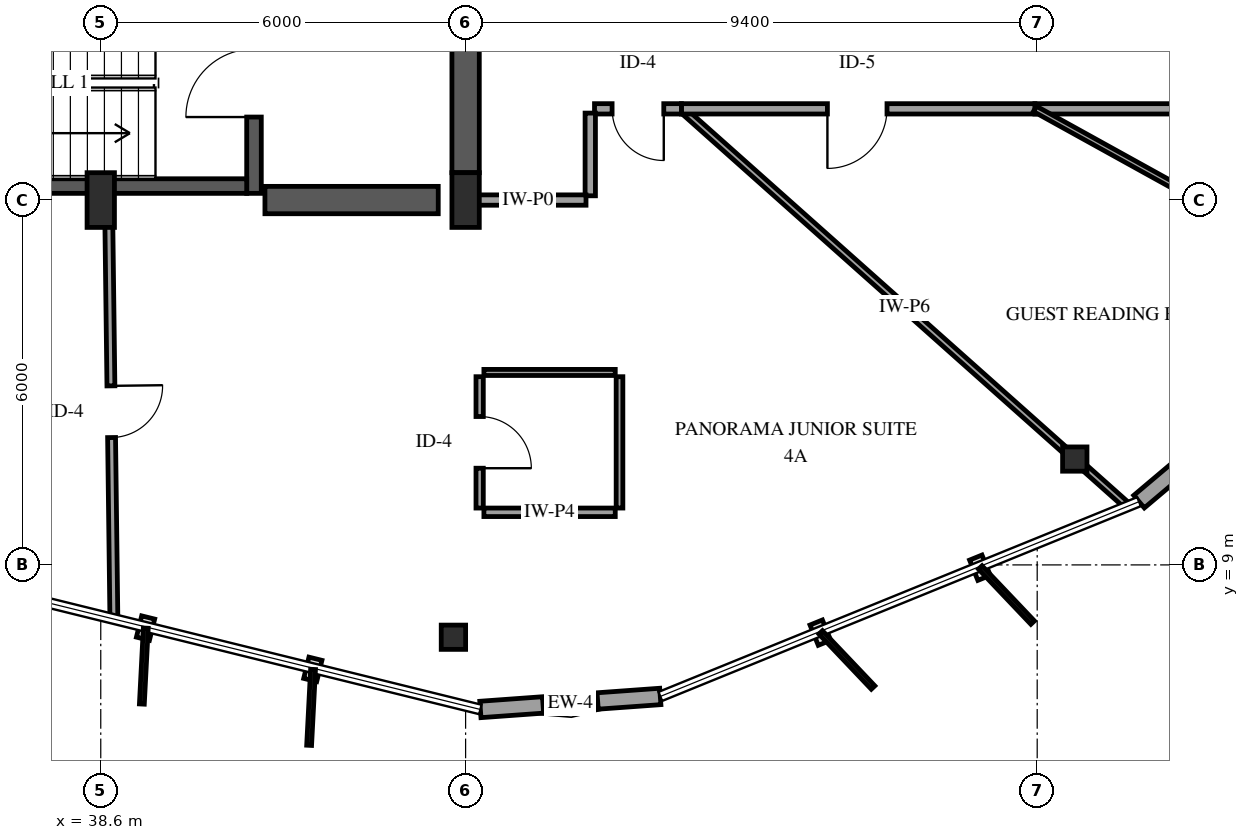
"""IFC4 building model, lengths in metres.
Left out: names, types, materials, properties, quantities, classifications, styles, units other than length and angle.
Written with IfcOpenShell. Run it as: python <this file> out.ifc"""

import sys

from ifc_helpers import new_model, si_unit, direction, frame, frame_2d, origin, origin_2d, place, context, subcontext, project, spatial, rectangle, i_section, extrude, element, fill, save


model = new_model("IFC4")
c1 = context("Model", 3, precision=1e-05, world=origin(), true_north=direction((0.0, 1.0)))
c2 = subcontext(c1, "Body", "Model", "MODEL_VIEW")
j1 = project(units=[si_unit("LENGTHUNIT", "METRE"), si_unit("PLANEANGLEUNIT", "RADIAN")], contexts=[c1])
p1 = place(None, origin())
s1 = spatial("IfcSite", under=j1, at=p1, CompositionType="ELEMENT")
p2 = place(p1, origin())
s2 = spatial("IfcBuilding", under=s1, at=p2, CompositionType="ELEMENT")
p3 = place(p2, frame((0.0, 0.0, 246.25)))
s3 = spatial("IfcBuildingStorey", under=s2, at=p3, CompositionType="ELEMENT", Elevation=246.25)
p4 = place(p3, frame((41.12, 15.11, 0.0), z_axis=(0.0, 0.0, 1.0), x_axis=(0.0, 1.0, 0.0)))
e1 = element("IfcWall", 1, at=p4, inside=s3, PredefinedType="SHEAR", context=c2, shape_type="SweptSolid", body=[
    extrude(rectangle(XDim=3.63, YDim=0.24, at=frame_2d((1.815, 0.0))), origin(), (0.0, 0.0, 1.0), 3.75),
])
p5 = place(p4, frame((1.255, 0.0, 0.0)))
e2 = element("IfcOpeningElement", 2, at=p5, cuts=e1, PredefinedType="OPENING", context=c2, shape_type="SweptSolid", body=[
    extrude(rectangle(XDim=1.12, YDim=2.15, at=frame_2d((0.56, 1.075))), frame((0.0, 0.13, 0.0), z_axis=(0.0, -1.0, 0.0), x_axis=(1.0, 0.0, 0.0)), (0.0, 0.0, 1.0), 0.26),
])
p6 = place(p3, frame((33.0, 15.23, 0.0), z_axis=(0.0, 0.0, 1.0), x_axis=(1.0, 0.0, 0.0)))
e3 = element("IfcWall", 3, at=p6, inside=s3, PredefinedType="SHEAR", context=c2, shape_type="SweptSolid", body=[
    extrude(rectangle(XDim=8.0, YDim=0.24, at=frame_2d((4.0, 0.0))), origin(), (0.0, 0.0, 1.0), 3.75),
])
p7 = place(p3, frame((41.3, 15.0, 0.0), z_axis=(0.0, 0.0, 1.0), x_axis=(1.0, 0.0, 0.0)))
e4 = element("IfcWall", 4, at=p7, inside=s3, PredefinedType="SHEAR", context=c2, shape_type="SweptSolid", body=[
    extrude(rectangle(XDim=2.85, YDim=0.45, at=frame_2d((1.425, 0.0))), origin(), (0.0, 0.0, 1.0), 3.75),
])
p8 = place(p3, frame((44.6, 15.45, 0.0), z_axis=(0.0, 0.0, 1.0), x_axis=(0.0, 1.0, 0.0)))
e5 = element("IfcWall", 5, at=p8, inside=s3, PredefinedType="SHEAR", context=c2, shape_type="SweptSolid", body=[
    extrude(rectangle(XDim=6.35, YDim=0.45, at=frame_2d((3.175, 0.0))), origin(), (0.0, 0.0, 1.0), 3.75),
])
for number, where, z_axis, x_axis in (
    (6, (38.6, 15.0, 0.0), (0.0, 0.0, 1.0), (1.0, 0.0, 0.0)),
    (7, (44.6, 15.0, 0.0), (0.0, 0.0, 1.0), (1.0, 0.0, 0.0)),
):
    element("IfcColumn", number, at=place(p3, frame(where, z_axis=z_axis, x_axis=x_axis)), inside=s3, PredefinedType="PILASTER", context=c2, shape_type="SweptSolid", body=[
        extrude(rectangle(XDim=0.45, YDim=0.9, at=origin_2d()), origin(), (0.0, 0.0, 1.0), 3.75),
    ])
for number, where, z_axis, x_axis in (
    (8, (44.4, 7.811, 0.0), (0.0, 0.0, 1.0), (1.0, 0.0, 0.0)),
    (9, (54.618, 10.74, 0.0), (0.0, 0.0, 1.0), (1.0, 0.0, 0.0)),
):
    element("IfcColumn", number, at=place(p3, frame(where, z_axis=z_axis, x_axis=x_axis)), inside=s3, PredefinedType="COLUMN", context=c2, shape_type="SweptSolid", body=[
        extrude(i_section(OverallWidth=0.401, OverallDepth=0.399, WebThickness=0.025, FlangeThickness=0.04, FilletRadius=0.038, at=origin_2d()), origin(), (0.0, 0.0, 1.0), 3.75),
    ])
p9 = place(p3, frame((44.843, 6.623, 0.0), z_axis=(0.0, 0.0, 1.0), x_axis=(0.997392270269, 0.072171041339, 0.0)))
e10 = element("IfcWall", 10, at=p9, inside=s3, PredefinedType="SOLIDWALL", context=c2, shape_type="SweptSolid", body=[
    extrude(rectangle(XDim=2.967, YDim=0.27, at=frame_2d((1.483, 0.0))), origin(), (0.0, 0.0, 1.0), 2.829),
])
p10 = place(p9, frame((1.033, 0.0, 0.75)))
e11 = element("IfcOpeningElement", 11, at=p10, cuts=e10, PredefinedType="OPENING", context=c2, shape_type="SweptSolid", body=[
    extrude(rectangle(XDim=0.9, YDim=1.5, at=frame_2d((0.45, 0.75))), frame((0.0, 0.145, 0.0), z_axis=(0.0, -1.0, 0.0), x_axis=(1.0, 0.0, 0.0)), (0.0, 0.0, 1.0), 0.29),
])
p11 = place(p3, frame((55.675, 10.04, 0.0), z_axis=(0.0, 0.0, 1.0), x_axis=(0.764511985062, 0.644609513347, 0.0)))
e12 = element("IfcWall", 12, at=p11, inside=s3, PredefinedType="SOLIDWALL", context=c2, shape_type="SweptSolid", body=[
    extrude(rectangle(XDim=2.967, YDim=0.27, at=frame_2d((1.483, 0.0))), origin(), (0.0, 0.0, 1.0), 2.829),
])
p12 = place(p11, frame((1.033, 0.0, 0.75)))
e13 = element("IfcOpeningElement", 13, at=p12, cuts=e12, PredefinedType="OPENING", context=c2, shape_type="SweptSolid", body=[
    extrude(rectangle(XDim=0.9, YDim=1.5, at=frame_2d((0.45, 0.75))), frame((0.0, 0.145, 0.0), z_axis=(0.0, -1.0, 0.0), x_axis=(1.0, 0.0, 0.0)), (0.0, 0.0, 1.0), 0.29),
])
p13 = place(p3, frame((48.149, 16.5, 0.0), z_axis=(0.0, 0.0, 1.0), x_axis=(0.746928074218, -0.664904844278, 0.0)))
e14 = element("IfcWall", 14, at=p13, inside=s3, PredefinedType="PARTITIONING", context=c2, shape_type="SweptSolid", body=[
    extrude(rectangle(XDim=9.828, YDim=0.11, at=frame_2d((4.914, 0.0))), origin(), (0.0, 0.0, 1.0), 2.828),
])
p14 = place(p3, frame((38.729, 14.929, 0.0), z_axis=(0.0, 0.0, 1.0), x_axis=(0.01274511582, -0.999918777713, 0.0)))
e15 = element("IfcWall", 15, at=p14, inside=s3, PredefinedType="PARTITIONING", context=c2, shape_type="SweptSolid", body=[
    extrude(rectangle(XDim=6.819, YDim=0.13, at=frame_2d((3.41, 0.0))), origin(), (0.0, 0.0, 1.0), 3.45),
])
p15 = place(p14, frame((2.985, 0.0, 0.0)))
e16 = element("IfcOpeningElement", 16, at=p15, cuts=e15, PredefinedType="OPENING", context=c2, shape_type="SweptSolid", body=[
    extrude(rectangle(XDim=0.85, YDim=2.1, at=frame_2d((0.425, 1.05))), frame((0.0, 0.075, 0.0), z_axis=(0.0, -1.0, 0.0), x_axis=(1.0, 0.0, 0.0)), (0.0, 0.0, 1.0), 0.15),
])
p16 = place(p3, frame((60.769, 16.5, 0.0), z_axis=(0.0, 0.0, 1.0), x_axis=(-1.0, 0.0, 0.0)))
e17 = element("IfcWall", 17, at=p16, inside=s3, PredefinedType="PARTITIONING", context=c2, shape_type="SweptSolid", body=[
    extrude(rectangle(XDim=6.807, YDim=0.17, at=frame_2d((3.404, 0.0))), origin(), (0.0, 0.0, 1.0), 3.45),
])
p17 = place(p16, frame((2.928, 0.0, 0.0)))
e18 = element("IfcOpeningElement", 18, at=p17, cuts=e17, PredefinedType="OPENING", context=c2, shape_type="SweptSolid", body=[
    extrude(rectangle(XDim=0.98, YDim=2.15, at=frame_2d((0.49, 1.075))), frame((0.0, 0.095, 0.0), z_axis=(0.0, -1.0, 0.0), x_axis=(1.0, 0.0, 0.0)), (0.0, 0.0, 1.0), 0.19),
])
p18 = place(p3, frame((53.962, 16.5, 0.0), z_axis=(0.0, 0.0, 1.0), x_axis=(-1.0, 0.0, 0.0)))
e19 = element("IfcWall", 19, at=p18, inside=s3, PredefinedType="PARTITIONING", context=c2, shape_type="SweptSolid", body=[
    extrude(rectangle(XDim=5.813, YDim=0.17, at=frame_2d((2.906, 0.0))), origin(), (0.0, 0.0, 1.0), 3.45),
])
p19 = place(p18, frame((2.432, 0.0, 0.0)))
e20 = element("IfcOpeningElement", 20, at=p19, cuts=e19, PredefinedType="OPENING", context=c2, shape_type="SweptSolid", body=[
    extrude(rectangle(XDim=0.98, YDim=2.15, at=frame_2d((0.49, 1.075))), frame((0.0, 0.095, 0.0), z_axis=(0.0, -1.0, 0.0), x_axis=(1.0, 0.0, 0.0)), (0.0, 0.0, 1.0), 0.19),
])
p20 = place(p3, frame((53.962, 16.5, 0.0), z_axis=(0.0, 0.0, 1.0), x_axis=(0.875035182715, -0.484059323855, 0.0)))
e21 = element("IfcWall", 21, at=p20, inside=s3, PredefinedType="PARTITIONING", context=c2, shape_type="SweptSolid", body=[
    extrude(rectangle(XDim=5.789, YDim=0.1, at=frame_2d((2.894, 0.0))), origin(), (0.0, 0.0, 1.0), 3.45),
])
p21 = place(p3, frame((44.831, 12.095, 0.0), z_axis=(0.0, 0.0, 1.0), x_axis=(0.0, -1.0, 0.0)))
e22 = element("IfcWall", 22, at=p21, inside=s3, PredefinedType="PARTITIONING", context=c2, shape_type="SweptSolid", body=[
    extrude(rectangle(XDim=2.16, YDim=0.12, at=frame_2d((1.08, 0.0))), origin(), (0.0, 0.0, 1.0), 2.828),
])
p22 = place(p21, frame((0.655, 0.0, 0.0)))
e23 = element("IfcOpeningElement", 23, at=p22, cuts=e22, PredefinedType="OPENING", context=c2, shape_type="SweptSolid", body=[
    extrude(rectangle(XDim=0.85, YDim=2.1, at=frame_2d((0.425, 1.05))), frame((0.0, 0.07, 0.0), z_axis=(0.0, -1.0, 0.0), x_axis=(1.0, 0.0, 0.0)), (0.0, 0.0, 1.0), 0.14),
])
p23 = place(p3, frame((47.131, 9.935, 0.0), z_axis=(0.0, 0.0, 1.0), x_axis=(0.0, 1.0, 0.0)))
e24 = element("IfcWall", 24, at=p23, inside=s3, PredefinedType="PARTITIONING", context=c2, shape_type="SweptSolid", body=[
    extrude(rectangle(XDim=2.16, YDim=0.11, at=frame_2d((1.08, 0.0))), origin(), (0.0, 0.0, 1.0), 3.45),
])
p24 = place(p3, frame((47.061, 12.165, 0.0), z_axis=(0.0, 0.0, 1.0), x_axis=(-1.0, 0.0, 0.0)))
e25 = element("IfcWall", 25, at=p24, inside=s3, PredefinedType="PARTITIONING", context=c2, shape_type="SweptSolid", body=[
    extrude(rectangle(XDim=2.16, YDim=0.1, at=frame_2d((1.08, 0.0))), origin(), (0.0, 0.0, 1.0), 3.45),
])
p25 = place(p3, frame((44.901, 9.865, 0.0), z_axis=(0.0, 0.0, 1.0), x_axis=(1.0, 0.0, 0.0)))
e26 = element("IfcWall", 26, at=p25, inside=s3, PredefinedType="PARTITIONING", context=c2, shape_type="SweptSolid", body=[
    extrude(rectangle(XDim=2.16, YDim=0.14, at=frame_2d((1.08, 0.0))), origin(), (0.0, 0.0, 1.0), 3.45),
])
p26 = place(p3, frame((48.149, 16.5, 0.0), z_axis=(0.0, 0.0, 1.0), x_axis=(-1.0, 0.0, 0.0)))
e27 = element("IfcWall", 27, at=p26, inside=s3, PredefinedType="PARTITIONING", context=c2, shape_type="SweptSolid", body=[
    extrude(rectangle(XDim=1.429, YDim=0.17, at=frame_2d((0.714, 0.0))), origin(), (0.0, 0.0, 1.0), 3.45),
])
p27 = place(p26, frame((0.29, 0.0, 0.0)))
e28 = element("IfcOpeningElement", 28, at=p27, cuts=e27, PredefinedType="OPENING", context=c2, shape_type="SweptSolid", body=[
    extrude(rectangle(XDim=0.85, YDim=2.1, at=frame_2d((0.425, 1.05))), frame((0.0, 0.095, 0.0), z_axis=(0.0, -1.0, 0.0), x_axis=(1.0, 0.0, 0.0)), (0.0, 0.0, 1.0), 0.19),
])
p28 = place(p3, frame((46.65, 16.43, 0.0), z_axis=(0.0, 0.0, 1.0), x_axis=(0.0, -1.0, 0.0)))
e29 = element("IfcWall", 29, at=p28, inside=s3, PredefinedType="PARTITIONING", context=c2, shape_type="SweptSolid", body=[
    extrude(rectangle(XDim=1.36, YDim=0.17, at=frame_2d((0.68, 0.0))), origin(), (0.0, 0.0, 1.0), 3.45),
])
p29 = place(p3, frame((46.58, 15.0, 0.0), z_axis=(0.0, 0.0, 1.0), x_axis=(-1.0, 0.0, 0.0)))
e30 = element("IfcWall", 30, at=p29, inside=s3, PredefinedType="PARTITIONING", context=c2, shape_type="SweptSolid", body=[
    extrude(rectangle(XDim=1.139, YDim=0.17, at=frame_2d((0.57, 0.0))), origin(), (0.0, 0.0, 1.0), 3.45),
])
p30 = place(p3, frame((45.439, 15.0, 0.0), z_axis=(0.0, 0.0, 1.0), x_axis=(-1.0, 0.0, 0.0)))
e31 = element("IfcWall", 31, at=p30, inside=s3, PredefinedType="PARTITIONING", context=c2, shape_type="SweptSolid", body=[
    extrude(rectangle(XDim=0.769, YDim=0.17, at=frame_2d((0.385, 0.0))), origin(), (0.0, 0.0, 1.0), 3.45),
])
p31 = place(p10, origin())
e32 = element("IfcWindow", 32, at=p31, inside=s3, PartitioningType="SINGLE_PANEL", PredefinedType="WINDOW", context=c2, shape_type="SweptSolid", body=[
    extrude(rectangle(XDim=0.9, YDim=1.5, at=frame_2d((0.45, 0.75))), frame((0.0, 0.03, 0.0), z_axis=(0.0, -1.0, 0.0), x_axis=(1.0, 0.0, 0.0)), (0.0, 0.0, 1.0), 0.06),
])
fill(e11, e32)
p32 = place(p5, origin())
e33 = element("IfcDoor", 33, at=p32, inside=s3, OperationType="SINGLE_SWING_LEFT", PredefinedType="DOOR", context=c2, shape_type="SweptSolid", body=[
    extrude(rectangle(XDim=1.12, YDim=2.15, at=frame_2d((0.56, 1.075))), frame((0.0, 0.025, 0.0), z_axis=(0.0, -1.0, 0.0), x_axis=(1.0, 0.0, 0.0)), (0.0, 0.0, 1.0), 0.05),
])
fill(e2, e33)
p33 = place(p15, origin())
e34 = element("IfcDoor", 34, at=p33, inside=s3, OperationType="SINGLE_SWING_LEFT", PredefinedType="DOOR", context=c2, shape_type="SweptSolid", body=[
    extrude(rectangle(XDim=0.85, YDim=2.1, at=frame_2d((0.425, 1.05))), frame((0.0, 0.025, 0.0), z_axis=(0.0, -1.0, 0.0), x_axis=(1.0, 0.0, 0.0)), (0.0, 0.0, 1.0), 0.05),
])
fill(e16, e34)
p34 = place(p19, origin())
e35 = element("IfcDoor", 35, at=p34, inside=s3, OperationType="SINGLE_SWING_RIGHT", PredefinedType="DOOR", context=c2, shape_type="SweptSolid", body=[
    extrude(rectangle(XDim=0.98, YDim=2.15, at=frame_2d((0.49, 1.075))), frame((0.0, 0.025, 0.0), z_axis=(0.0, -1.0, 0.0), x_axis=(1.0, 0.0, 0.0)), (0.0, 0.0, 1.0), 0.05),
])
fill(e20, e35)
p35 = place(p22, origin())
e36 = element("IfcDoor", 36, at=p35, inside=s3, OperationType="SINGLE_SWING_RIGHT", PredefinedType="DOOR", context=c2, shape_type="SweptSolid", body=[
    extrude(rectangle(XDim=0.85, YDim=2.1, at=frame_2d((0.425, 1.05))), frame((0.0, 0.025, 0.0), z_axis=(0.0, -1.0, 0.0), x_axis=(1.0, 0.0, 0.0)), (0.0, 0.0, 1.0), 0.05),
])
fill(e23, e36)
p36 = place(p27, origin())
e37 = element("IfcDoor", 37, at=p36, inside=s3, OperationType="SINGLE_SWING_LEFT", PredefinedType="DOOR", context=c2, shape_type="SweptSolid", body=[
    extrude(rectangle(XDim=0.85, YDim=2.1, at=frame_2d((0.425, 1.05))), frame((0.0, 0.025, 0.0), z_axis=(0.0, -1.0, 0.0), x_axis=(1.0, 0.0, 0.0)), (0.0, 0.0, 1.0), 0.05),
])
fill(e28, e37)
save(model, sys.argv[1])
